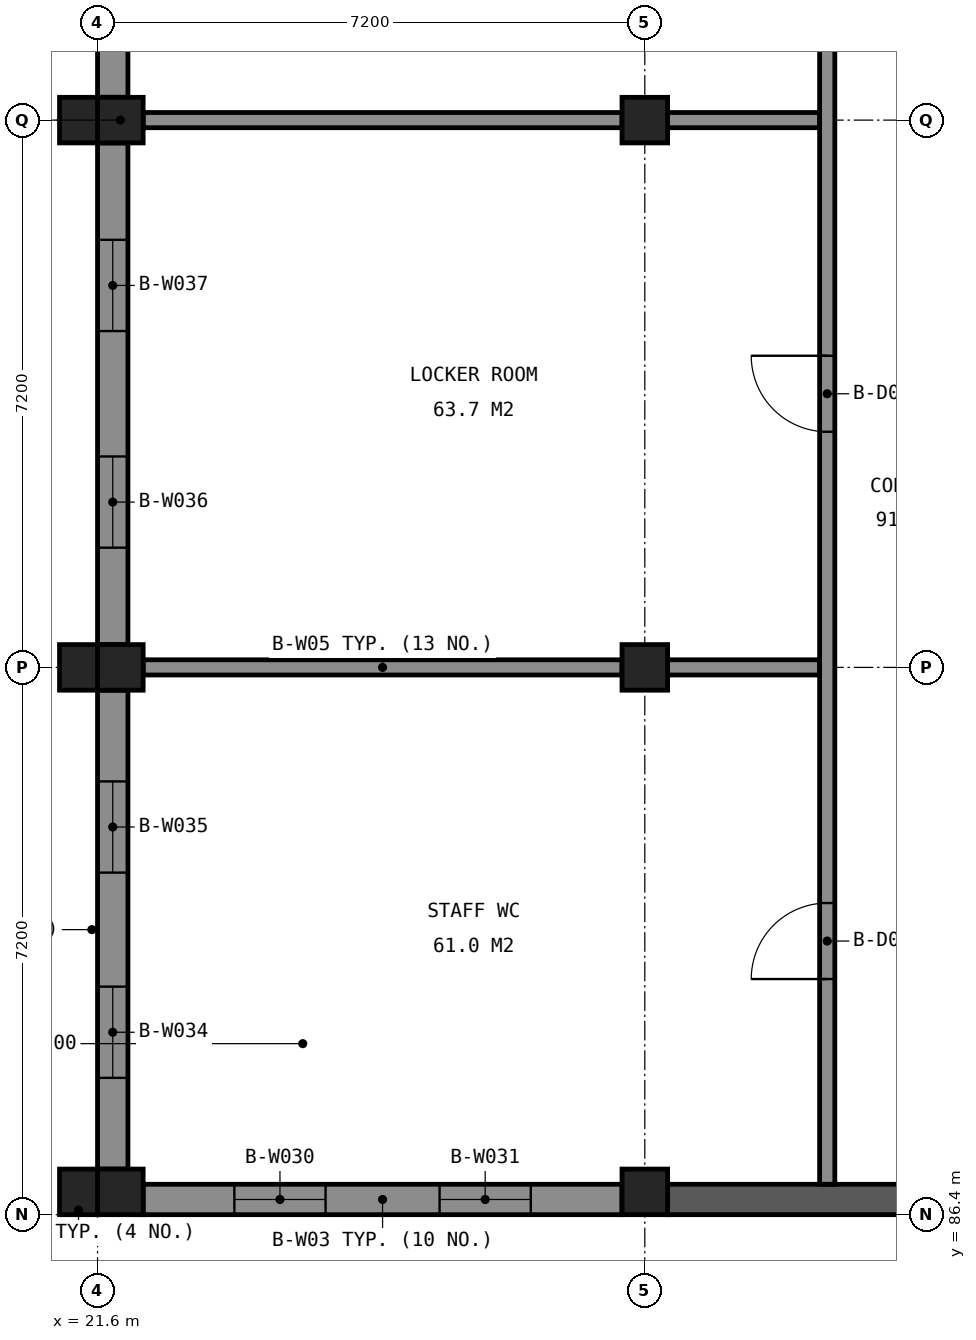
"""IFC4 building model, lengths in metres.
Left out: names, types, materials, properties, quantities, classifications, styles, units other than length and angle.
Written with IfcOpenShell. Run it as: python <this file> out.ifc"""

import sys

from ifc_helpers import new_model, si_unit, direction, frame, frame_2d, origin, origin_2d, place, context, subcontext, project, spatial, rectangle, extrude, element, fill, save


model = new_model("IFC4")
c1 = context("Model", 3, precision=1e-05, world=origin(), true_north=direction((0.0, 1.0)))
c2 = subcontext(c1, "Body", "Model", "MODEL_VIEW")
j1 = project(units=[si_unit("LENGTHUNIT", "METRE"), si_unit("PLANEANGLEUNIT", "RADIAN")], contexts=[c1])
p1 = place(None, origin())
s1 = spatial("IfcSite", under=j1, at=p1, CompositionType="ELEMENT")
p2 = place(p1, origin())
s2 = spatial("IfcBuilding", under=s1, at=p2, CompositionType="ELEMENT")
p3 = place(p2, frame((0.0, 0.0, 9.6)))
s3 = spatial("IfcBuildingStorey", under=s2, at=p3, CompositionType="ELEMENT", Elevation=9.6)
for number, where, z_axis, x_axis in (
    (1, (21.9, 100.8, 0.0), (0.0, 0.0, 1.0), (1.0, 0.0, 0.0)),
    (2, (21.9, 93.6, 0.0), (0.0, 0.0, 1.0), (1.0, 0.0, 0.0)),
    (3, (21.9, 86.7, 0.0), (0.0, 0.0, 1.0), (1.0, 0.0, 0.0)),
    (4, (28.8, 100.8, 0.0), (0.0, 0.0, 1.0), (1.0, 0.0, 0.0)),
    (5, (28.8, 93.6, 0.0), (0.0, 0.0, 1.0), (1.0, 0.0, 0.0)),
    (6, (28.8, 86.7, 0.0), (0.0, 0.0, 1.0), (1.0, 0.0, 0.0)),
):
    element("IfcColumn", number, at=place(p3, frame(where, z_axis=z_axis, x_axis=x_axis)), inside=s3, PredefinedType="COLUMN", context=c2, shape_type="SweptSolid", body=[
        extrude(rectangle(XDim=0.6, YDim=0.6, at=origin_2d()), origin(), (0.0, 0.0, 1.0), 4.8),
    ])
p4 = place(p3, frame((29.1, 86.6, 0.0), z_axis=(0.0, 0.0, 1.0), x_axis=(1.0, 0.0, 0.0)))
e7 = element("IfcWall", 7, at=p4, inside=s3, PredefinedType="SHEAR", context=c2, shape_type="SweptSolid", body=[
    extrude(rectangle(XDim=13.7, YDim=0.4, at=frame_2d((6.85, 0.0))), origin(), (0.0, 0.0, 1.0), 4.55),
])
p5 = place(p3, frame((22.2, 86.6, 0.0), z_axis=(0.0, 0.0, 1.0), x_axis=(1.0, 0.0, 0.0)))
e8 = element("IfcWall", 8, at=p5, inside=s3, PredefinedType="SOLIDWALL", context=c2, shape_type="SweptSolid", body=[
    extrude(rectangle(XDim=6.3, YDim=0.4, at=frame_2d((3.15, 0.0))), origin(), (0.0, 0.0, 1.0), 3.95),
])
p6 = place(p5, frame((1.2, 0.0, 0.9)))
e9 = element("IfcOpeningElement", 9, at=p6, cuts=e8, PredefinedType="OPENING", context=c2, shape_type="SweptSolid", body=[
    extrude(rectangle(XDim=1.2, YDim=2.4, at=frame_2d((0.6, 1.2))), frame((0.0, 0.21, 0.0), z_axis=(0.0, -1.0, 0.0), x_axis=(1.0, 0.0, 0.0)), (0.0, 0.0, 1.0), 0.42),
])
p7 = place(p5, frame((3.9, 0.0, 0.9)))
e10 = element("IfcOpeningElement", 10, at=p7, cuts=e8, PredefinedType="OPENING", context=c2, shape_type="SweptSolid", body=[
    extrude(rectangle(XDim=1.2, YDim=2.4, at=frame_2d((0.6, 1.2))), frame((0.0, 0.21, 0.0), z_axis=(0.0, -1.0, 0.0), x_axis=(1.0, 0.0, 0.0)), (0.0, 0.0, 1.0), 0.42),
])
p8 = place(p3, frame((21.8, 87.0, 0.0), z_axis=(0.0, 0.0, 1.0), x_axis=(0.0, 1.0, 0.0)))
e11 = element("IfcWall", 11, at=p8, inside=s3, PredefinedType="SOLIDWALL", context=c2, shape_type="SweptSolid", body=[
    extrude(rectangle(XDim=6.3, YDim=0.4, at=frame_2d((3.15, 0.0))), origin(), (0.0, 0.0, 1.0), 3.95),
])
p9 = place(p8, frame((1.2, 0.0, 0.9)))
e12 = element("IfcOpeningElement", 12, at=p9, cuts=e11, PredefinedType="OPENING", context=c2, shape_type="SweptSolid", body=[
    extrude(rectangle(XDim=1.2, YDim=2.4, at=frame_2d((0.6, 1.2))), frame((0.0, 0.21, 0.0), z_axis=(0.0, -1.0, 0.0), x_axis=(1.0, 0.0, 0.0)), (0.0, 0.0, 1.0), 0.42),
])
p10 = place(p8, frame((3.9, 0.0, 0.9)))
e13 = element("IfcOpeningElement", 13, at=p10, cuts=e11, PredefinedType="OPENING", context=c2, shape_type="SweptSolid", body=[
    extrude(rectangle(XDim=1.2, YDim=2.4, at=frame_2d((0.6, 1.2))), frame((0.0, 0.21, 0.0), z_axis=(0.0, -1.0, 0.0), x_axis=(1.0, 0.0, 0.0)), (0.0, 0.0, 1.0), 0.42),
])
p11 = place(p3, frame((21.8, 93.9, 0.0), z_axis=(0.0, 0.0, 1.0), x_axis=(0.0, 1.0, 0.0)))
e14 = element("IfcWall", 14, at=p11, inside=s3, PredefinedType="SOLIDWALL", context=c2, shape_type="SweptSolid", body=[
    extrude(rectangle(XDim=6.6, YDim=0.4, at=frame_2d((3.3, 0.0))), origin(), (0.0, 0.0, 1.0), 3.95),
])
p12 = place(p11, frame((1.275, 0.0, 0.9)))
e15 = element("IfcOpeningElement", 15, at=p12, cuts=e14, PredefinedType="OPENING", context=c2, shape_type="SweptSolid", body=[
    extrude(rectangle(XDim=1.2, YDim=2.4, at=frame_2d((0.6, 1.2))), frame((0.0, 0.21, 0.0), z_axis=(0.0, -1.0, 0.0), x_axis=(1.0, 0.0, 0.0)), (0.0, 0.0, 1.0), 0.42),
])
p13 = place(p11, frame((4.125, 0.0, 0.9)))
e16 = element("IfcOpeningElement", 16, at=p13, cuts=e14, PredefinedType="OPENING", context=c2, shape_type="SweptSolid", body=[
    extrude(rectangle(XDim=1.2, YDim=2.4, at=frame_2d((0.6, 1.2))), frame((0.0, 0.21, 0.0), z_axis=(0.0, -1.0, 0.0), x_axis=(1.0, 0.0, 0.0)), (0.0, 0.0, 1.0), 0.42),
])
p14 = place(p3, frame((21.8, 101.1, 0.0), z_axis=(0.0, 0.0, 1.0), x_axis=(0.0, 1.0, 0.0)))
e17 = element("IfcWall", 17, at=p14, inside=s3, PredefinedType="SOLIDWALL", context=c2, shape_type="SweptSolid", body=[
    extrude(rectangle(XDim=6.6, YDim=0.4, at=frame_2d((3.3, 0.0))), origin(), (0.0, 0.0, 1.0), 3.95),
])
p15 = place(p14, frame((1.275, 0.0, 0.9)))
e18 = element("IfcOpeningElement", 18, at=p15, cuts=e17, PredefinedType="OPENING", context=c2, shape_type="SweptSolid", body=[
    extrude(rectangle(XDim=1.2, YDim=2.4, at=frame_2d((0.6, 1.2))), frame((0.0, 0.21, 0.0), z_axis=(0.0, -1.0, 0.0), x_axis=(1.0, 0.0, 0.0)), (0.0, 0.0, 1.0), 0.42),
])
p16 = place(p14, frame((4.125, 0.0, 0.9)))
e19 = element("IfcOpeningElement", 19, at=p16, cuts=e17, PredefinedType="OPENING", context=c2, shape_type="SweptSolid", body=[
    extrude(rectangle(XDim=1.2, YDim=2.4, at=frame_2d((0.6, 1.2))), frame((0.0, 0.21, 0.0), z_axis=(0.0, -1.0, 0.0), x_axis=(1.0, 0.0, 0.0)), (0.0, 0.0, 1.0), 0.42),
])
for number, where, z_axis, x_axis in (
    (20, (21.35, 86.7, 0.0), (0.0, 0.0, 1.0), (1.0, 0.0, 0.0)),
    (21, (21.35, 93.6, 0.0), (0.0, 0.0, 1.0), (1.0, 0.0, 0.0)),
    (22, (21.35, 100.8, 0.0), (0.0, 0.0, 1.0), (1.0, 0.0, 0.0)),
):
    element("IfcColumn", number, at=place(p3, frame(where, z_axis=z_axis, x_axis=x_axis)), inside=s3, PredefinedType="COLUMN", context=c2, shape_type="SweptSolid", body=[
        extrude(rectangle(XDim=0.5, YDim=0.6, at=origin_2d()), origin(), (0.0, 0.0, 1.0), 4.8),
    ])
p17 = place(p3, frame((21.525, 87.0, -0.15), z_axis=(0.0, 0.0, 1.0), x_axis=(0.0, 1.0, 0.0)))
e23 = element("IfcWall", 23, at=p17, inside=s3, PredefinedType="SOLIDWALL", context=c2, shape_type="SweptSolid", body=[
    extrude(rectangle(XDim=6.3, YDim=0.15, at=frame_2d((3.15, 0.0))), origin(), (0.0, 0.0, 1.0), 0.3),
])
p18 = place(p3, frame((21.525, 93.9, -0.15), z_axis=(0.0, 0.0, 1.0), x_axis=(0.0, 1.0, 0.0)))
e24 = element("IfcWall", 24, at=p18, inside=s3, PredefinedType="SOLIDWALL", context=c2, shape_type="SweptSolid", body=[
    extrude(rectangle(XDim=6.6, YDim=0.15, at=frame_2d((3.3, 0.0))), origin(), (0.0, 0.0, 1.0), 0.3),
])
p19 = place(p3, frame((21.525, 101.1, -0.15), z_axis=(0.0, 0.0, 1.0), x_axis=(0.0, 1.0, 0.0)))
e25 = element("IfcWall", 25, at=p19, inside=s3, PredefinedType="SOLIDWALL", context=c2, shape_type="SweptSolid", body=[
    extrude(rectangle(XDim=6.6, YDim=0.15, at=frame_2d((3.3, 0.0))), origin(), (0.0, 0.0, 1.0), 0.3),
])
p20 = place(p3, frame((22.2, 93.6, 0.0), z_axis=(0.0, 0.0, 1.0), x_axis=(1.0, 0.0, 0.0)))
e26 = element("IfcWall", 26, at=p20, inside=s3, PredefinedType="PARTITIONING", context=c2, shape_type="SweptSolid", body=[
    extrude(rectangle(XDim=6.3, YDim=0.2, at=frame_2d((3.15, 0.0))), origin(), (0.0, 0.0, 1.0), 3.95),
])
p21 = place(p3, frame((29.1, 93.6, 0.0), z_axis=(0.0, 0.0, 1.0), x_axis=(1.0, 0.0, 0.0)))
e27 = element("IfcWall", 27, at=p21, inside=s3, PredefinedType="PARTITIONING", context=c2, shape_type="SweptSolid", body=[
    extrude(rectangle(XDim=2.0, YDim=0.2, at=frame_2d((1.0, 0.0))), origin(), (0.0, 0.0, 1.0), 3.95),
])
p22 = place(p3, frame((22.2, 100.8, 0.0), z_axis=(0.0, 0.0, 1.0), x_axis=(1.0, 0.0, 0.0)))
e28 = element("IfcWall", 28, at=p22, inside=s3, PredefinedType="PARTITIONING", context=c2, shape_type="SweptSolid", body=[
    extrude(rectangle(XDim=6.3, YDim=0.2, at=frame_2d((3.15, 0.0))), origin(), (0.0, 0.0, 1.0), 3.95),
])
p23 = place(p3, frame((29.1, 100.8, 0.0), z_axis=(0.0, 0.0, 1.0), x_axis=(1.0, 0.0, 0.0)))
e29 = element("IfcWall", 29, at=p23, inside=s3, PredefinedType="PARTITIONING", context=c2, shape_type="SweptSolid", body=[
    extrude(rectangle(XDim=2.0, YDim=0.2, at=frame_2d((1.0, 0.0))), origin(), (0.0, 0.0, 1.0), 3.95),
])
p24 = place(p3, frame((31.2, 86.8, 0.0), z_axis=(0.0, 0.0, 1.0), x_axis=(0.0, 1.0, 0.0)))
e30 = element("IfcWall", 30, at=p24, inside=s3, PredefinedType="PARTITIONING", context=c2, shape_type="SweptSolid", body=[
    extrude(rectangle(XDim=42.4, YDim=0.2, at=frame_2d((21.2, 0.0))), origin(), (0.0, 0.0, 1.0), 3.95),
])
p25 = place(p24, frame((37.1, 0.0, 0.0)))
e31 = element("IfcOpeningElement", 31, at=p25, cuts=e30, PredefinedType="OPENING", context=c2, shape_type="SweptSolid", body=[
    extrude(rectangle(XDim=1.8, YDim=2.1, at=frame_2d((0.9, 1.05))), frame((0.0, 0.11, 0.0), z_axis=(0.0, -1.0, 0.0), x_axis=(1.0, 0.0, 0.0)), (0.0, 0.0, 1.0), 0.22),
])
p26 = place(p24, frame((27.5, 0.0, 0.0)))
e32 = element("IfcOpeningElement", 32, at=p26, cuts=e30, PredefinedType="OPENING", context=c2, shape_type="SweptSolid", body=[
    extrude(rectangle(XDim=1.8, YDim=2.1, at=frame_2d((0.9, 1.05))), frame((0.0, 0.11, 0.0), z_axis=(0.0, -1.0, 0.0), x_axis=(1.0, 0.0, 0.0)), (0.0, 0.0, 1.0), 0.22),
])
p27 = place(p24, frame((17.9, 0.0, 0.0)))
e33 = element("IfcOpeningElement", 33, at=p27, cuts=e30, PredefinedType="OPENING", context=c2, shape_type="SweptSolid", body=[
    extrude(rectangle(XDim=1.8, YDim=2.1, at=frame_2d((0.9, 1.05))), frame((0.0, 0.11, 0.0), z_axis=(0.0, -1.0, 0.0), x_axis=(1.0, 0.0, 0.0)), (0.0, 0.0, 1.0), 0.22),
])
p28 = place(p24, frame((9.9, 0.0, 0.0)))
e34 = element("IfcOpeningElement", 34, at=p28, cuts=e30, PredefinedType="OPENING", context=c2, shape_type="SweptSolid", body=[
    extrude(rectangle(XDim=1.0, YDim=2.1, at=frame_2d((0.5, 1.05))), frame((0.0, 0.11, 0.0), z_axis=(0.0, -1.0, 0.0), x_axis=(1.0, 0.0, 0.0)), (0.0, 0.0, 1.0), 0.22),
])
p29 = place(p24, frame((2.7, 0.0, 0.0)))
e35 = element("IfcOpeningElement", 35, at=p29, cuts=e30, PredefinedType="OPENING", context=c2, shape_type="SweptSolid", body=[
    extrude(rectangle(XDim=1.0, YDim=2.1, at=frame_2d((0.5, 1.05))), frame((0.0, 0.11, 0.0), z_axis=(0.0, -1.0, 0.0), x_axis=(1.0, 0.0, 0.0)), (0.0, 0.0, 1.0), 0.22),
])
p30 = place(p6, origin())
e36 = element("IfcWindow", 36, at=p30, inside=s3, PartitioningType="SINGLE_PANEL", PredefinedType="WINDOW", context=c2, shape_type="SweptSolid", body=[
    extrude(rectangle(XDim=1.2, YDim=2.4, at=frame_2d((0.6, 1.2))), frame((0.0, 0.03, 0.0), z_axis=(0.0, -1.0, 0.0), x_axis=(1.0, 0.0, 0.0)), (0.0, 0.0, 1.0), 0.06),
])
fill(e9, e36)
p31 = place(p7, origin())
e37 = element("IfcWindow", 37, at=p31, inside=s3, PartitioningType="SINGLE_PANEL", PredefinedType="WINDOW", context=c2, shape_type="SweptSolid", body=[
    extrude(rectangle(XDim=1.2, YDim=2.4, at=frame_2d((0.6, 1.2))), frame((0.0, 0.03, 0.0), z_axis=(0.0, -1.0, 0.0), x_axis=(1.0, 0.0, 0.0)), (0.0, 0.0, 1.0), 0.06),
])
fill(e10, e37)
p32 = place(p9, origin())
e38 = element("IfcWindow", 38, at=p32, inside=s3, PartitioningType="SINGLE_PANEL", PredefinedType="WINDOW", context=c2, shape_type="SweptSolid", body=[
    extrude(rectangle(XDim=1.2, YDim=2.4, at=frame_2d((0.6, 1.2))), frame((0.0, 0.03, 0.0), z_axis=(0.0, -1.0, 0.0), x_axis=(1.0, 0.0, 0.0)), (0.0, 0.0, 1.0), 0.06),
])
fill(e12, e38)
p33 = place(p10, origin())
e39 = element("IfcWindow", 39, at=p33, inside=s3, PartitioningType="SINGLE_PANEL", PredefinedType="WINDOW", context=c2, shape_type="SweptSolid", body=[
    extrude(rectangle(XDim=1.2, YDim=2.4, at=frame_2d((0.6, 1.2))), frame((0.0, 0.03, 0.0), z_axis=(0.0, -1.0, 0.0), x_axis=(1.0, 0.0, 0.0)), (0.0, 0.0, 1.0), 0.06),
])
fill(e13, e39)
p34 = place(p12, origin())
e40 = element("IfcWindow", 40, at=p34, inside=s3, PartitioningType="SINGLE_PANEL", PredefinedType="WINDOW", context=c2, shape_type="SweptSolid", body=[
    extrude(rectangle(XDim=1.2, YDim=2.4, at=frame_2d((0.6, 1.2))), frame((0.0, 0.03, 0.0), z_axis=(0.0, -1.0, 0.0), x_axis=(1.0, 0.0, 0.0)), (0.0, 0.0, 1.0), 0.06),
])
fill(e15, e40)
p35 = place(p13, origin())
e41 = element("IfcWindow", 41, at=p35, inside=s3, PartitioningType="SINGLE_PANEL", PredefinedType="WINDOW", context=c2, shape_type="SweptSolid", body=[
    extrude(rectangle(XDim=1.2, YDim=2.4, at=frame_2d((0.6, 1.2))), frame((0.0, 0.03, 0.0), z_axis=(0.0, -1.0, 0.0), x_axis=(1.0, 0.0, 0.0)), (0.0, 0.0, 1.0), 0.06),
])
fill(e16, e41)
p36 = place(p28, origin())
e42 = element("IfcDoor", 42, at=p36, inside=s3, OperationType="SINGLE_SWING_RIGHT", PredefinedType="DOOR", context=c2, shape_type="SweptSolid", body=[
    extrude(rectangle(XDim=1.0, YDim=2.1, at=frame_2d((0.5, 1.05))), frame((0.0, 0.025, 0.0), z_axis=(0.0, -1.0, 0.0), x_axis=(1.0, 0.0, 0.0)), (0.0, 0.0, 1.0), 0.05),
])
fill(e34, e42)
p37 = place(p29, origin())
e43 = element("IfcDoor", 43, at=p37, inside=s3, OperationType="SINGLE_SWING_LEFT", PredefinedType="DOOR", context=c2, shape_type="SweptSolid", body=[
    extrude(rectangle(XDim=1.0, YDim=2.1, at=frame_2d((0.5, 1.05))), frame((0.0, 0.025, 0.0), z_axis=(0.0, -1.0, 0.0), x_axis=(1.0, 0.0, 0.0)), (0.0, 0.0, 1.0), 0.05),
])
fill(e35, e43)
save(model, sys.argv[1])
